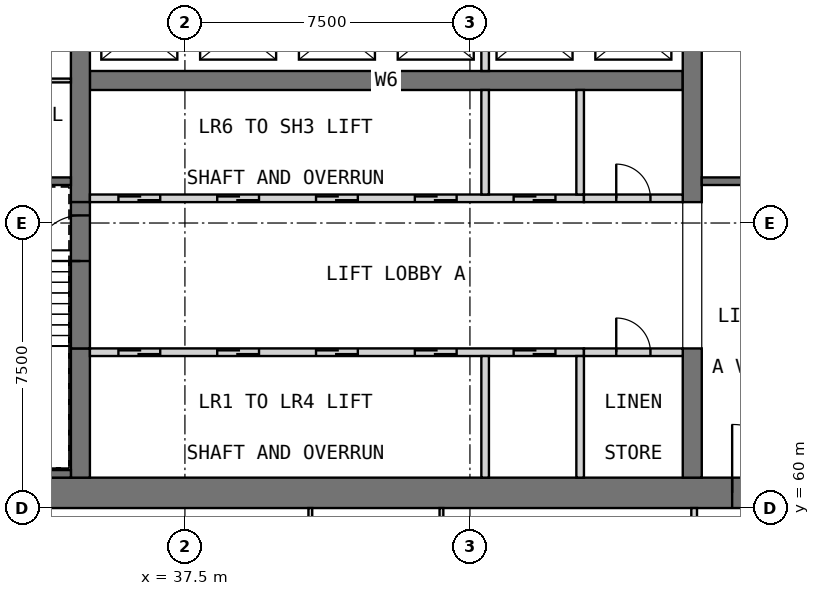
"""IFC4 building model, lengths in metres.
Left out: names, types, materials, properties, quantities, classifications, styles, units other than length and angle.
Written with IfcOpenShell. Run it as: python <this file> out.ifc"""

import sys

from ifc_helpers import new_model, si_unit, direction, frame, frame_2d, origin, place, context, subcontext, project, spatial, rectangle, extrude, element, fill, save


model = new_model("IFC4")
c1 = context("Model", 3, precision=1e-05, world=origin(), true_north=direction((0.0, 1.0)))
c2 = subcontext(c1, "Body", "Model", "MODEL_VIEW")
j1 = project(units=[si_unit("LENGTHUNIT", "METRE"), si_unit("PLANEANGLEUNIT", "RADIAN")], contexts=[c1])
p1 = place(None, origin())
s1 = spatial("IfcSite", under=j1, at=p1, CompositionType="ELEMENT")
p2 = place(p1, origin())
s2 = spatial("IfcBuilding", under=s1, at=p2, CompositionType="ELEMENT")
p3 = place(p2, frame((0.0, 0.0, 124.2)))
s3 = spatial("IfcBuildingStorey", under=s2, at=p3, CompositionType="ELEMENT", Elevation=124.2)
p4 = place(p3, frame((30.0, 60.4, 0.0), z_axis=(0.0, 0.0, 1.0), x_axis=(1.0, 0.0, 0.0)))
e1 = element("IfcWall", 1, at=p4, inside=s3, PredefinedType="SHEAR", context=c2, shape_type="SweptSolid", body=[
    extrude(rectangle(XDim=30.0, YDim=0.8, at=frame_2d((15.0, 0.0))), origin(), (0.0, 0.0, 1.0), 6.0),
])
p5 = place(p4, frame((21.9, 0.0, 0.0)))
e2 = element("IfcOpeningElement", 2, at=p5, cuts=e1, PredefinedType="OPENING", context=c2, shape_type="SweptSolid", body=[
    extrude(rectangle(XDim=1.8, YDim=2.1, at=frame_2d((0.9, 1.05))), frame((0.0, 0.41, 0.0), z_axis=(0.0, -1.0, 0.0), x_axis=(1.0, 0.0, 0.0)), (0.0, 0.0, 1.0), 0.82),
])
p6 = place(p4, frame((26.5, 0.0, 0.0)))
e3 = element("IfcOpeningElement", 3, at=p6, cuts=e1, PredefinedType="OPENING", context=c2, shape_type="SweptSolid", body=[
    extrude(rectangle(XDim=1.2, YDim=2.1, at=frame_2d((0.6, 1.05))), frame((0.0, 0.41, 0.0), z_axis=(0.0, -1.0, 0.0), x_axis=(1.0, 0.0, 0.0)), (0.0, 0.0, 1.0), 0.82),
])
p7 = place(p3, frame((35.0, 71.25, 0.0), z_axis=(0.0, 0.0, 1.0), x_axis=(1.0, 0.0, 0.0)))
e4 = element("IfcWall", 4, at=p7, inside=s3, PredefinedType="SHEAR", context=c2, shape_type="SweptSolid", body=[
    extrude(rectangle(XDim=15.6, YDim=0.5, at=frame_2d((7.8, 0.0))), origin(), (0.0, 0.0, 1.0), 6.0),
])
p8 = place(p3, frame((34.75, 60.8, 0.0), z_axis=(0.0, 0.0, 1.0), x_axis=(0.0, 1.0, 0.0)))
e5 = element("IfcWall", 5, at=p8, inside=s3, PredefinedType="SHEAR", context=c2, shape_type="SweptSolid", body=[
    extrude(rectangle(XDim=3.4, YDim=0.5, at=frame_2d((1.7, 0.0))), origin(), (0.0, 0.0, 1.0), 6.0),
])
p9 = place(p3, frame((34.75, 68.05, 0.0), z_axis=(0.0, 0.0, 1.0), x_axis=(0.0, 1.0, 0.0)))
e6 = element("IfcWall", 6, at=p9, inside=s3, PredefinedType="SHEAR", context=c2, shape_type="SweptSolid", body=[
    extrude(rectangle(XDim=6.4, YDim=0.5, at=frame_2d((3.2, 0.0))), origin(), (0.0, 0.0, 1.0), 6.0),
])
p10 = place(p3, frame((50.85, 60.8, 0.0), z_axis=(0.0, 0.0, 1.0), x_axis=(0.0, 1.0, 0.0)))
e7 = element("IfcWall", 7, at=p10, inside=s3, PredefinedType="SHEAR", context=c2, shape_type="SweptSolid", body=[
    extrude(rectangle(XDim=3.4, YDim=0.5, at=frame_2d((1.7, 0.0))), origin(), (0.0, 0.0, 1.0), 6.0),
])
p11 = place(p3, frame((50.85, 68.05, 0.0), z_axis=(0.0, 0.0, 1.0), x_axis=(0.0, 1.0, 0.0)))
e8 = element("IfcWall", 8, at=p11, inside=s3, PredefinedType="SHEAR", context=c2, shape_type="SweptSolid", body=[
    extrude(rectangle(XDim=6.4, YDim=0.5, at=frame_2d((3.2, 0.0))), origin(), (0.0, 0.0, 1.0), 6.0),
])
p12 = place(p3, frame((35.0, 64.1, 0.0), z_axis=(0.0, 0.0, 1.0), x_axis=(1.0, 0.0, 0.0)))
e9 = element("IfcWall", 9, at=p12, inside=s3, PredefinedType="SOLIDWALL", context=c2, shape_type="SweptSolid", body=[
    extrude(rectangle(XDim=13.0, YDim=0.2, at=frame_2d((6.5, 0.0))), origin(), (0.0, 0.0, 1.0), 6.0),
])
p13 = place(p12, frame((0.75, 0.0, 0.0)))
e10 = element("IfcOpeningElement", 10, at=p13, cuts=e9, PredefinedType="OPENING", context=c2, shape_type="SweptSolid", body=[
    extrude(rectangle(XDim=1.1, YDim=2.1, at=frame_2d((0.55, 1.05))), frame((0.0, 0.11, 0.0), z_axis=(0.0, -1.0, 0.0), x_axis=(1.0, 0.0, 0.0)), (0.0, 0.0, 1.0), 0.22),
])
p14 = place(p12, frame((3.35, 0.0, 0.0)))
e11 = element("IfcOpeningElement", 11, at=p14, cuts=e9, PredefinedType="OPENING", context=c2, shape_type="SweptSolid", body=[
    extrude(rectangle(XDim=1.1, YDim=2.1, at=frame_2d((0.55, 1.05))), frame((0.0, 0.11, 0.0), z_axis=(0.0, -1.0, 0.0), x_axis=(1.0, 0.0, 0.0)), (0.0, 0.0, 1.0), 0.22),
])
p15 = place(p12, frame((5.95, 0.0, 0.0)))
e12 = element("IfcOpeningElement", 12, at=p15, cuts=e9, PredefinedType="OPENING", context=c2, shape_type="SweptSolid", body=[
    extrude(rectangle(XDim=1.1, YDim=2.1, at=frame_2d((0.55, 1.05))), frame((0.0, 0.11, 0.0), z_axis=(0.0, -1.0, 0.0), x_axis=(1.0, 0.0, 0.0)), (0.0, 0.0, 1.0), 0.22),
])
p16 = place(p12, frame((8.55, 0.0, 0.0)))
e13 = element("IfcOpeningElement", 13, at=p16, cuts=e9, PredefinedType="OPENING", context=c2, shape_type="SweptSolid", body=[
    extrude(rectangle(XDim=1.1, YDim=2.1, at=frame_2d((0.55, 1.05))), frame((0.0, 0.11, 0.0), z_axis=(0.0, -1.0, 0.0), x_axis=(1.0, 0.0, 0.0)), (0.0, 0.0, 1.0), 0.22),
])
p17 = place(p12, frame((11.15, 0.0, 0.0)))
e14 = element("IfcOpeningElement", 14, at=p17, cuts=e9, PredefinedType="OPENING", context=c2, shape_type="SweptSolid", body=[
    extrude(rectangle(XDim=1.1, YDim=2.1, at=frame_2d((0.55, 1.05))), frame((0.0, 0.11, 0.0), z_axis=(0.0, -1.0, 0.0), x_axis=(1.0, 0.0, 0.0)), (0.0, 0.0, 1.0), 0.22),
])
for number, where, z_axis, x_axis in (
    (15, (45.4, 60.8, 0.0), (0.0, 0.0, 1.0), (0.0, 1.0, 0.0)),
    (16, (47.9, 60.8, 0.0), (0.0, 0.0, 1.0), (0.0, 1.0, 0.0)),
):
    element("IfcWall", number, at=place(p3, frame(where, z_axis=z_axis, x_axis=x_axis)), inside=s3, PredefinedType="SOLIDWALL", context=c2, shape_type="SweptSolid", body=[
        extrude(rectangle(XDim=3.2, YDim=0.2, at=frame_2d((1.6, 0.0))), origin(), (0.0, 0.0, 1.0), 6.0),
    ])
p18 = place(p3, frame((48.0, 64.1, 0.0), z_axis=(0.0, 0.0, 1.0), x_axis=(1.0, 0.0, 0.0)))
e17 = element("IfcWall", 17, at=p18, inside=s3, PredefinedType="PARTITIONING", context=c2, shape_type="SweptSolid", body=[
    extrude(rectangle(XDim=2.6, YDim=0.2, at=frame_2d((1.3, 0.0))), origin(), (0.0, 0.0, 1.0), 5.75),
])
p19 = place(p18, frame((0.85, 0.0, 0.0)))
e18 = element("IfcOpeningElement", 18, at=p19, cuts=e17, PredefinedType="OPENING", context=c2, shape_type="SweptSolid", body=[
    extrude(rectangle(XDim=0.9, YDim=2.1, at=frame_2d((0.45, 1.05))), frame((0.0, 0.11, 0.0), z_axis=(0.0, -1.0, 0.0), x_axis=(1.0, 0.0, 0.0)), (0.0, 0.0, 1.0), 0.22),
])
p20 = place(p3, frame((35.0, 68.15, 0.0), z_axis=(0.0, 0.0, 1.0), x_axis=(1.0, 0.0, 0.0)))
e19 = element("IfcWall", 19, at=p20, inside=s3, PredefinedType="SOLIDWALL", context=c2, shape_type="SweptSolid", body=[
    extrude(rectangle(XDim=13.0, YDim=0.2, at=frame_2d((6.5, 0.0))), origin(), (0.0, 0.0, 1.0), 6.0),
])
p21 = place(p20, frame((0.75, 0.0, 0.0)))
e20 = element("IfcOpeningElement", 20, at=p21, cuts=e19, PredefinedType="OPENING", context=c2, shape_type="SweptSolid", body=[
    extrude(rectangle(XDim=1.1, YDim=2.1, at=frame_2d((0.55, 1.05))), frame((0.0, 0.11, 0.0), z_axis=(0.0, -1.0, 0.0), x_axis=(1.0, 0.0, 0.0)), (0.0, 0.0, 1.0), 0.22),
])
p22 = place(p20, frame((3.35, 0.0, 0.0)))
e21 = element("IfcOpeningElement", 21, at=p22, cuts=e19, PredefinedType="OPENING", context=c2, shape_type="SweptSolid", body=[
    extrude(rectangle(XDim=1.1, YDim=2.1, at=frame_2d((0.55, 1.05))), frame((0.0, 0.11, 0.0), z_axis=(0.0, -1.0, 0.0), x_axis=(1.0, 0.0, 0.0)), (0.0, 0.0, 1.0), 0.22),
])
p23 = place(p20, frame((5.95, 0.0, 0.0)))
e22 = element("IfcOpeningElement", 22, at=p23, cuts=e19, PredefinedType="OPENING", context=c2, shape_type="SweptSolid", body=[
    extrude(rectangle(XDim=1.1, YDim=2.1, at=frame_2d((0.55, 1.05))), frame((0.0, 0.11, 0.0), z_axis=(0.0, -1.0, 0.0), x_axis=(1.0, 0.0, 0.0)), (0.0, 0.0, 1.0), 0.22),
])
p24 = place(p20, frame((8.55, 0.0, 0.0)))
e23 = element("IfcOpeningElement", 23, at=p24, cuts=e19, PredefinedType="OPENING", context=c2, shape_type="SweptSolid", body=[
    extrude(rectangle(XDim=1.1, YDim=2.1, at=frame_2d((0.55, 1.05))), frame((0.0, 0.11, 0.0), z_axis=(0.0, -1.0, 0.0), x_axis=(1.0, 0.0, 0.0)), (0.0, 0.0, 1.0), 0.22),
])
p25 = place(p20, frame((11.15, 0.0, 0.0)))
e24 = element("IfcOpeningElement", 24, at=p25, cuts=e19, PredefinedType="OPENING", context=c2, shape_type="SweptSolid", body=[
    extrude(rectangle(XDim=1.1, YDim=2.1, at=frame_2d((0.55, 1.05))), frame((0.0, 0.11, 0.0), z_axis=(0.0, -1.0, 0.0), x_axis=(1.0, 0.0, 0.0)), (0.0, 0.0, 1.0), 0.22),
])
for number, where, z_axis, x_axis in (
    (25, (45.4, 68.25, 0.0), (0.0, 0.0, 1.0), (0.0, 1.0, 0.0)),
    (26, (47.9, 68.25, 0.0), (0.0, 0.0, 1.0), (0.0, 1.0, 0.0)),
):
    element("IfcWall", number, at=place(p3, frame(where, z_axis=z_axis, x_axis=x_axis)), inside=s3, PredefinedType="SOLIDWALL", context=c2, shape_type="SweptSolid", body=[
        extrude(rectangle(XDim=2.75, YDim=0.2, at=frame_2d((1.375, 0.0))), origin(), (0.0, 0.0, 1.0), 6.0),
    ])
p26 = place(p3, frame((48.0, 68.15, 0.0), z_axis=(0.0, 0.0, 1.0), x_axis=(1.0, 0.0, 0.0)))
e27 = element("IfcWall", 27, at=p26, inside=s3, PredefinedType="PARTITIONING", context=c2, shape_type="SweptSolid", body=[
    extrude(rectangle(XDim=2.6, YDim=0.2, at=frame_2d((1.3, 0.0))), origin(), (0.0, 0.0, 1.0), 5.75),
])
p27 = place(p26, frame((0.85, 0.0, 0.0)))
e28 = element("IfcOpeningElement", 28, at=p27, cuts=e27, PredefinedType="OPENING", context=c2, shape_type="SweptSolid", body=[
    extrude(rectangle(XDim=0.9, YDim=2.1, at=frame_2d((0.45, 1.05))), frame((0.0, 0.11, 0.0), z_axis=(0.0, -1.0, 0.0), x_axis=(1.0, 0.0, 0.0)), (0.0, 0.0, 1.0), 0.22),
])
p28 = place(p3, frame((45.4, 71.5, 0.0), z_axis=(0.0, 0.0, 1.0), x_axis=(0.0, 1.0, 0.0)))
e29 = element("IfcWall", 29, at=p28, inside=s3, PredefinedType="SOLIDWALL", context=c2, shape_type="SweptSolid", body=[
    extrude(rectangle(XDim=2.0, YDim=0.2, at=frame_2d((1.0, 0.0))), origin(), (0.0, 0.0, 1.0), 6.0),
])
p29 = place(p3, frame((34.75, 64.2, 0.0), z_axis=(0.0, 0.0, 1.0), x_axis=(0.0, 1.0, 0.0)))
e30 = element("IfcWall", 30, at=p29, inside=s3, PredefinedType="SOLIDWALL", context=c2, shape_type="SweptSolid", body=[
    extrude(rectangle(XDim=3.85, YDim=0.5, at=frame_2d((1.925, 0.0))), origin(), (0.0, 0.0, 1.0), 4.8),
])
p30 = place(p29, frame((2.3, 0.0, 0.0)))
e31 = element("IfcOpeningElement", 31, at=p30, cuts=e30, PredefinedType="OPENING", context=c2, shape_type="SweptSolid", body=[
    extrude(rectangle(XDim=1.2, YDim=2.1, at=frame_2d((0.6, 1.05))), frame((0.0, 0.26, 0.0), z_axis=(0.0, -1.0, 0.0), x_axis=(1.0, 0.0, 0.0)), (0.0, 0.0, 1.0), 0.52),
])
p31 = place(p3, frame((30.8, 68.6, 0.0), z_axis=(0.0, 0.0, 1.0), x_axis=(1.0, 0.0, 0.0)))
e32 = element("IfcWall", 32, at=p31, inside=s3, PredefinedType="SOLIDWALL", context=c2, shape_type="SweptSolid", body=[
    extrude(rectangle(XDim=3.7, YDim=0.2, at=frame_2d((1.85, 0.0))), origin(), (0.0, 0.0, 1.0), 5.75),
])
p32 = place(p31, frame((1.5, 0.0, 0.0)))
e33 = element("IfcOpeningElement", 33, at=p32, cuts=e32, PredefinedType="OPENING", context=c2, shape_type="SweptSolid", body=[
    extrude(rectangle(XDim=0.9, YDim=2.1, at=frame_2d((0.45, 1.05))), frame((0.0, 0.11, 0.0), z_axis=(0.0, -1.0, 0.0), x_axis=(1.0, 0.0, 0.0)), (0.0, 0.0, 1.0), 0.22),
])
p33 = place(p3, frame((51.1, 68.6, 0.0), z_axis=(0.0, 0.0, 1.0), x_axis=(1.0, 0.0, 0.0)))
e34 = element("IfcWall", 34, at=p33, inside=s3, PredefinedType="SOLIDWALL", context=c2, shape_type="SweptSolid", body=[
    extrude(rectangle(XDim=8.1, YDim=0.2, at=frame_2d((4.05, 0.0))), origin(), (0.0, 0.0, 1.0), 5.75),
])
p34 = place(p3, frame((31.0, 60.9, 0.0), z_axis=(0.0, 0.0, 1.0), x_axis=(1.0, 0.0, 0.0)))
e35 = element("IfcWall", 35, at=p34, inside=s3, PredefinedType="SOLIDWALL", context=c2, shape_type="SweptSolid", body=[
    extrude(rectangle(XDim=3.5, YDim=0.2, at=frame_2d((1.75, 0.0))), origin(), (0.0, 0.0, 1.0), 5.75),
])
p35 = place(p3, frame((30.8, 71.25, 0.0), z_axis=(0.0, 0.0, 1.0), x_axis=(1.0, 0.0, 0.0)))
e36 = element("IfcWall", 36, at=p35, inside=s3, PredefinedType="PARTITIONING", context=c2, shape_type="SweptSolid", body=[
    extrude(rectangle(XDim=3.7, YDim=0.1, at=frame_2d((1.85, 0.0))), origin(), (0.0, 0.0, 1.0), 5.75),
])
for number, where, z_axis, x_axis in (
    (37, (40.8, 52.575, 0.0), (0.0, 0.0, 1.0), (0.0, 1.0, 0.0)),
    (38, (44.25, 52.575, 0.0), (0.0, 0.0, 1.0), (0.0, 1.0, 0.0)),
):
    element("IfcWall", number, at=place(p3, frame(where, z_axis=z_axis, x_axis=x_axis)), inside=s3, PredefinedType="PARTITIONING", context=c2, shape_type="SweptSolid", body=[
        extrude(rectangle(XDim=7.425, YDim=0.1, at=frame_2d((3.712, 0.0))), origin(), (0.0, 0.0, 1.0), 5.75),
    ])
p36 = place(p3, frame((50.9, 52.575, 0.0), z_axis=(0.0, 0.0, 1.0), x_axis=(0.0, 1.0, 0.0)))
e39 = element("IfcWall", 39, at=p36, inside=s3, PredefinedType="PARTITIONING", context=c2, shape_type="SweptSolid", body=[
    extrude(rectangle(XDim=7.425, YDim=0.15, at=frame_2d((3.712, 0.0))), origin(), (0.0, 0.0, 1.0), 5.75),
])
p37 = place(p13, origin())
e40 = element("IfcDoor", 40, at=p37, inside=s3, OperationType="DOUBLE_DOOR_SLIDING", PredefinedType="DOOR", context=c2, shape_type="SweptSolid", body=[
    extrude(rectangle(XDim=1.1, YDim=2.1, at=frame_2d((0.55, 1.05))), frame((0.0, 0.025, 0.0), z_axis=(0.0, -1.0, 0.0), x_axis=(1.0, 0.0, 0.0)), (0.0, 0.0, 1.0), 0.05),
])
fill(e10, e40)
p38 = place(p14, origin())
e41 = element("IfcDoor", 41, at=p38, inside=s3, OperationType="DOUBLE_DOOR_SLIDING", PredefinedType="DOOR", context=c2, shape_type="SweptSolid", body=[
    extrude(rectangle(XDim=1.1, YDim=2.1, at=frame_2d((0.55, 1.05))), frame((0.0, 0.025, 0.0), z_axis=(0.0, -1.0, 0.0), x_axis=(1.0, 0.0, 0.0)), (0.0, 0.0, 1.0), 0.05),
])
fill(e11, e41)
p39 = place(p15, origin())
e42 = element("IfcDoor", 42, at=p39, inside=s3, OperationType="DOUBLE_DOOR_SLIDING", PredefinedType="DOOR", context=c2, shape_type="SweptSolid", body=[
    extrude(rectangle(XDim=1.1, YDim=2.1, at=frame_2d((0.55, 1.05))), frame((0.0, 0.025, 0.0), z_axis=(0.0, -1.0, 0.0), x_axis=(1.0, 0.0, 0.0)), (0.0, 0.0, 1.0), 0.05),
])
fill(e12, e42)
p40 = place(p16, origin())
e43 = element("IfcDoor", 43, at=p40, inside=s3, OperationType="DOUBLE_DOOR_SLIDING", PredefinedType="DOOR", context=c2, shape_type="SweptSolid", body=[
    extrude(rectangle(XDim=1.1, YDim=2.1, at=frame_2d((0.55, 1.05))), frame((0.0, 0.025, 0.0), z_axis=(0.0, -1.0, 0.0), x_axis=(1.0, 0.0, 0.0)), (0.0, 0.0, 1.0), 0.05),
])
fill(e13, e43)
p41 = place(p17, origin())
e44 = element("IfcDoor", 44, at=p41, inside=s3, OperationType="DOUBLE_DOOR_SLIDING", PredefinedType="DOOR", context=c2, shape_type="SweptSolid", body=[
    extrude(rectangle(XDim=1.1, YDim=2.1, at=frame_2d((0.55, 1.05))), frame((0.0, 0.025, 0.0), z_axis=(0.0, -1.0, 0.0), x_axis=(1.0, 0.0, 0.0)), (0.0, 0.0, 1.0), 0.05),
])
fill(e14, e44)
p42 = place(p19, origin())
e45 = element("IfcDoor", 45, at=p42, inside=s3, OperationType="SINGLE_SWING_RIGHT", PredefinedType="DOOR", context=c2, shape_type="SweptSolid", body=[
    extrude(rectangle(XDim=0.9, YDim=2.1, at=frame_2d((0.45, 1.05))), frame((0.0, 0.025, 0.0), z_axis=(0.0, -1.0, 0.0), x_axis=(1.0, 0.0, 0.0)), (0.0, 0.0, 1.0), 0.05),
])
fill(e18, e45)
p43 = place(p21, origin())
e46 = element("IfcDoor", 46, at=p43, inside=s3, OperationType="DOUBLE_DOOR_SLIDING", PredefinedType="DOOR", context=c2, shape_type="SweptSolid", body=[
    extrude(rectangle(XDim=1.1, YDim=2.1, at=frame_2d((0.55, 1.05))), frame((0.0, 0.025, 0.0), z_axis=(0.0, -1.0, 0.0), x_axis=(1.0, 0.0, 0.0)), (0.0, 0.0, 1.0), 0.05),
])
fill(e20, e46)
p44 = place(p22, origin())
e47 = element("IfcDoor", 47, at=p44, inside=s3, OperationType="DOUBLE_DOOR_SLIDING", PredefinedType="DOOR", context=c2, shape_type="SweptSolid", body=[
    extrude(rectangle(XDim=1.1, YDim=2.1, at=frame_2d((0.55, 1.05))), frame((0.0, 0.025, 0.0), z_axis=(0.0, -1.0, 0.0), x_axis=(1.0, 0.0, 0.0)), (0.0, 0.0, 1.0), 0.05),
])
fill(e21, e47)
p45 = place(p23, origin())
e48 = element("IfcDoor", 48, at=p45, inside=s3, OperationType="DOUBLE_DOOR_SLIDING", PredefinedType="DOOR", context=c2, shape_type="SweptSolid", body=[
    extrude(rectangle(XDim=1.1, YDim=2.1, at=frame_2d((0.55, 1.05))), frame((0.0, 0.025, 0.0), z_axis=(0.0, -1.0, 0.0), x_axis=(1.0, 0.0, 0.0)), (0.0, 0.0, 1.0), 0.05),
])
fill(e22, e48)
p46 = place(p24, origin())
e49 = element("IfcDoor", 49, at=p46, inside=s3, OperationType="DOUBLE_DOOR_SLIDING", PredefinedType="DOOR", context=c2, shape_type="SweptSolid", body=[
    extrude(rectangle(XDim=1.1, YDim=2.1, at=frame_2d((0.55, 1.05))), frame((0.0, 0.025, 0.0), z_axis=(0.0, -1.0, 0.0), x_axis=(1.0, 0.0, 0.0)), (0.0, 0.0, 1.0), 0.05),
])
fill(e23, e49)
p47 = place(p25, origin())
e50 = element("IfcDoor", 50, at=p47, inside=s3, OperationType="DOUBLE_DOOR_SLIDING", PredefinedType="DOOR", context=c2, shape_type="SweptSolid", body=[
    extrude(rectangle(XDim=1.1, YDim=2.1, at=frame_2d((0.55, 1.05))), frame((0.0, 0.025, 0.0), z_axis=(0.0, -1.0, 0.0), x_axis=(1.0, 0.0, 0.0)), (0.0, 0.0, 1.0), 0.05),
])
fill(e24, e50)
p48 = place(p27, origin())
e51 = element("IfcDoor", 51, at=p48, inside=s3, OperationType="SINGLE_SWING_RIGHT", PredefinedType="DOOR", context=c2, shape_type="SweptSolid", body=[
    extrude(rectangle(XDim=0.9, YDim=2.1, at=frame_2d((0.45, 1.05))), frame((0.0, 0.025, 0.0), z_axis=(0.0, -1.0, 0.0), x_axis=(1.0, 0.0, 0.0)), (0.0, 0.0, 1.0), 0.05),
])
fill(e28, e51)
p49 = place(p5, origin())
e52 = element("IfcDoor", 52, at=p49, inside=s3, OperationType="DOUBLE_DOOR_SINGLE_SWING", PredefinedType="DOOR", context=c2, shape_type="SweptSolid", body=[
    extrude(rectangle(XDim=1.8, YDim=2.1, at=frame_2d((0.9, 1.05))), frame((0.0, 0.025, 0.0), z_axis=(0.0, -1.0, 0.0), x_axis=(1.0, 0.0, 0.0)), (0.0, 0.0, 1.0), 0.05),
])
fill(e2, e52)
p50 = place(p30, origin())
e53 = element("IfcDoor", 53, at=p50, inside=s3, OperationType="SINGLE_SWING_LEFT", PredefinedType="DOOR", context=c2, shape_type="SweptSolid", body=[
    extrude(rectangle(XDim=1.2, YDim=2.1, at=frame_2d((0.6, 1.05))), frame((0.0, 0.025, 0.0), z_axis=(0.0, -1.0, 0.0), x_axis=(1.0, 0.0, 0.0)), (0.0, 0.0, 1.0), 0.05),
])
fill(e31, e53)
save(model, sys.argv[1])
